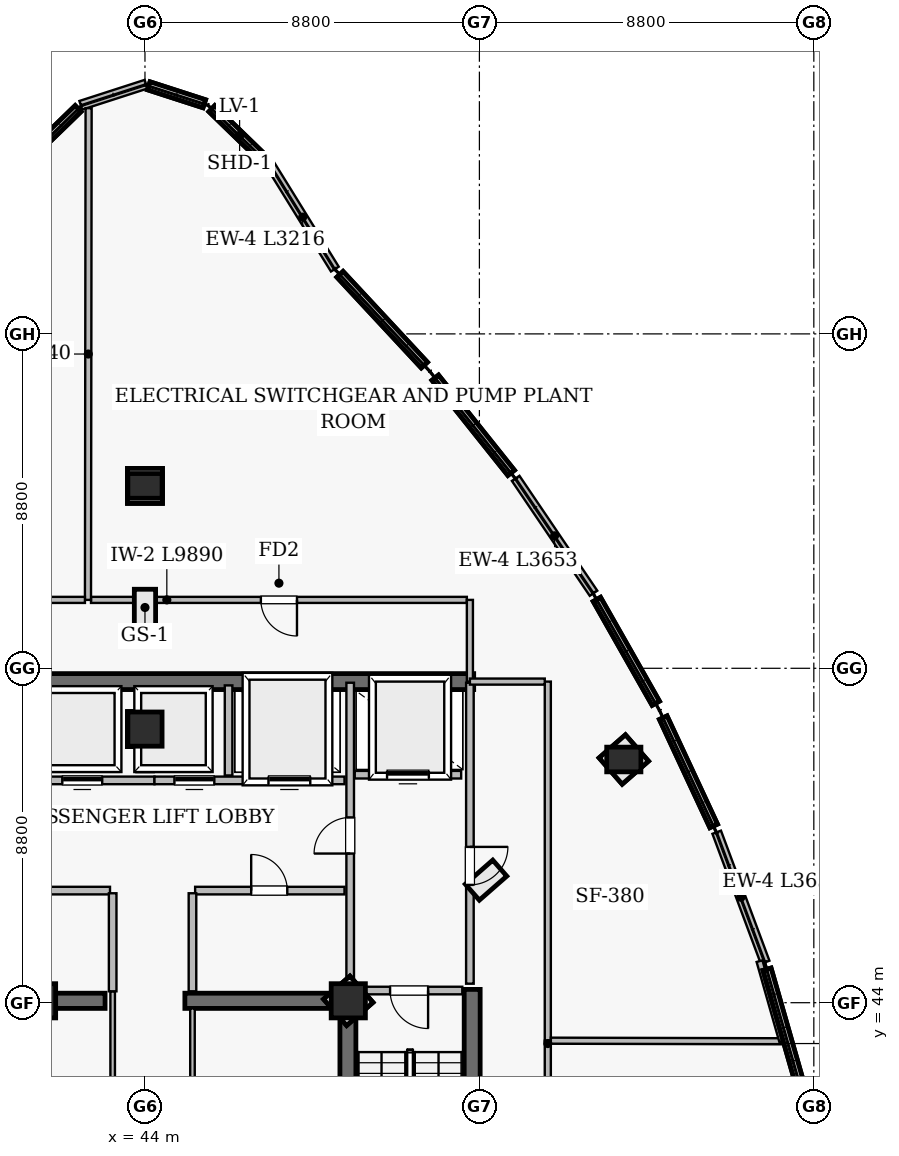
"""IFC4 building model, lengths in metres.
Left out: names, types, materials, properties, quantities, classifications, styles, units other than length and angle.
Written with IfcOpenShell. Run it as: python <this file> out.ifc"""

import sys

from ifc_helpers import new_model, si_unit, direction, frame, frame_2d, origin, origin_2d, place, context, subcontext, project, spatial, rectangle, extrude, element, fill, save


model = new_model("IFC4")
c1 = context("Model", 3, precision=1e-05, world=origin(), true_north=direction((0.0, 1.0)))
c2 = subcontext(c1, "Body", "Model", "MODEL_VIEW")
j1 = project(units=[si_unit("LENGTHUNIT", "METRE"), si_unit("PLANEANGLEUNIT", "RADIAN")], contexts=[c1])
p1 = place(None, origin())
s1 = spatial("IfcSite", under=j1, at=p1, CompositionType="ELEMENT")
p2 = place(p1, origin())
s2 = spatial("IfcBuilding", under=s1, at=p2, CompositionType="ELEMENT")
p3 = place(p2, frame((0.0, 0.0, 282.8)))
s3 = spatial("IfcBuildingStorey", under=s2, at=p3, CompositionType="ELEMENT", Elevation=282.8)
p4 = place(p3, frame((35.35, 52.45, 0.0), z_axis=(0.0, 0.0, 1.0), x_axis=(1.0, 0.0, 0.0)))
e1 = element("IfcWall", 1, at=p4, inside=s3, PredefinedType="SHEAR", context=c2, shape_type="SweptSolid", body=[
    extrude(rectangle(XDim=17.3, YDim=0.42, at=frame_2d((8.65, 0.0))), origin(), (0.0, 0.0, 1.0), 6.51),
])
p5 = place(p3, frame((52.61, 35.18, 0.0), z_axis=(0.0, 0.0, 1.0), x_axis=(0.0, 1.0, 0.0)))
e2 = element("IfcWall", 2, at=p5, inside=s3, PredefinedType="SHEAR", context=c2, shape_type="SweptSolid", body=[
    extrude(rectangle(XDim=9.17, YDim=0.42, at=frame_2d((4.585, 0.0))), origin(), (0.0, 0.0, 1.0), 6.51),
])
p6 = place(p3, frame((49.34, 35.4, 0.0), z_axis=(0.0, 0.0, 1.0), x_axis=(0.0, 1.0, 0.0)))
e3 = element("IfcWall", 3, at=p6, inside=s3, PredefinedType="SHEAR", context=c2, shape_type="SweptSolid", body=[
    extrude(rectangle(XDim=8.95, YDim=0.42, at=frame_2d((4.475, 0.0))), origin(), (0.0, 0.0, 1.0), 6.51),
])
p7 = place(p3, frame((44.0, 50.1, 0.0), z_axis=(0.0, 0.0, 1.0), x_axis=(0.0, 1.0, 0.0)))
e4 = element("IfcWall", 4, at=p7, inside=s3, PredefinedType="SHEAR", context=c2, shape_type="SweptSolid", body=[
    extrude(rectangle(XDim=2.1, YDim=0.4, at=frame_2d((1.05, 0.0))), origin(), (0.0, 0.0, 1.0), 6.51),
])
for number, where, z_axis, x_axis in (
    (5, (38.75, 44.05, 0.0), (0.0, 0.0, 1.0), (1.0, 0.0, 0.0)),
    (6, (45.05, 44.05, 0.0), (0.0, 0.0, 1.0), (1.0, 0.0, 0.0)),
):
    element("IfcWall", number, at=place(p3, frame(where, z_axis=z_axis, x_axis=x_axis)), inside=s3, PredefinedType="SHEAR", context=c2, shape_type="SweptSolid", body=[
        extrude(rectangle(XDim=4.2, YDim=0.4, at=frame_2d((2.1, 0.0))), origin(), (0.0, 0.0, 1.0), 6.51),
    ])
for number, where, z_axis, x_axis in (
    (7, (49.35, 44.05, 0.0), (0.0, 0.0, 1.0), (1.0, 0.0, 0.0)),
    (8, (44.0, 51.2, 0.0), (0.0, 0.0, 1.0), (1.0, 0.0, 0.0)),
    (9, (41.2, 44.05, 0.0), (0.0, 0.0, 1.0), (1.0, 0.0, 0.0)),
):
    element("IfcColumn", number, at=place(p3, frame(where, z_axis=z_axis, x_axis=x_axis)), inside=s3, PredefinedType="COLUMN", context=c2, shape_type="SweptSolid", body=[
        extrude(rectangle(XDim=0.9, YDim=0.9, at=origin_2d()), origin(), (0.0, 0.0, 1.0), 6.8),
    ])
for number, where, z_axis, x_axis in (
    (10, (44.0, 57.6, 0.0), (0.0, 0.0, 1.0), (1.0, 0.0, 0.0)),
    (11, (56.6, 50.4, 0.0), (0.0, 0.0, 1.0), (1.0, 0.0, 0.0)),
):
    element("IfcColumn", number, at=place(p3, frame(where, z_axis=z_axis, x_axis=x_axis)), inside=s3, PredefinedType="COLUMN", context=c2, shape_type="SweptSolid", body=[
        extrude(rectangle(XDim=0.9, YDim=0.65, at=origin_2d()), origin(), (0.0, 0.0, 1.0), 6.8),
    ])
p8 = place(p3, frame((48.996, 63.305, 0.0), z_axis=(0.0, 0.0, 1.0), x_axis=(-0.526048785292, 0.850454393541, 0.0)))
e12 = element("IfcWall", 12, at=p8, inside=s3, PredefinedType="SOLIDWALL", context=c2, shape_type="SweptSolid", body=[
    extrude(rectangle(XDim=3.216, YDim=0.24, at=frame_2d((1.608, 0.0))), origin(), (0.0, 0.0, 1.0), 6.51),
])
p9 = place(p3, frame((44.029, 68.17, 0.0), z_axis=(0.0, 0.0, 1.0), x_axis=(-0.951512079285, -0.307611383039, 0.0)))
e13 = element("IfcWall", 13, at=p9, inside=s3, PredefinedType="SOLIDWALL", context=c2, shape_type="SweptSolid", body=[
    extrude(rectangle(XDim=1.805, YDim=0.24, at=frame_2d((0.902, 0.0))), origin(), (0.0, 0.0, 1.0), 6.51),
])
p10 = place(p3, frame((60.319, 45.063, 0.0), z_axis=(0.0, 0.0, 1.0), x_axis=(-0.349042271825, 0.937106980274, 0.0)))
e14 = element("IfcWall", 14, at=p10, inside=s3, PredefinedType="SOLIDWALL", context=c2, shape_type="SweptSolid", body=[
    extrude(rectangle(XDim=3.653, YDim=0.24, at=frame_2d((1.826, 0.0))), origin(), (0.0, 0.0, 1.0), 6.51),
])
p11 = place(p3, frame((55.803, 54.774, 0.0), z_axis=(0.0, 0.0, 1.0), x_axis=(-0.560839277874, 0.827924697297, 0.0)))
e15 = element("IfcWall", 15, at=p11, inside=s3, PredefinedType="SOLIDWALL", context=c2, shape_type="SweptSolid", body=[
    extrude(rectangle(XDim=3.653, YDim=0.24, at=frame_2d((1.826, 0.0))), origin(), (0.0, 0.0, 1.0), 6.51),
])
p12 = place(p3, frame((52.47, 54.6, 0.0), z_axis=(0.0, 0.0, 1.0), x_axis=(-1.0, 0.0, 0.0)))
e16 = element("IfcWall", 16, at=p12, inside=s3, PredefinedType="SOLIDWALL", context=c2, shape_type="SweptSolid", body=[
    extrude(rectangle(XDim=9.89, YDim=0.16, at=frame_2d((4.945, 0.0))), origin(), (0.0, 0.0, 1.0), 5.798),
])
p13 = place(p12, frame((4.47, 0.0, 0.0)))
e17 = element("IfcOpeningElement", 17, at=p13, cuts=e16, PredefinedType="OPENING", context=c2, shape_type="SweptSolid", body=[
    extrude(rectangle(XDim=0.95, YDim=2.15, at=frame_2d((0.475, 1.075))), frame((0.0, 0.09, 0.0), z_axis=(0.0, -1.0, 0.0), x_axis=(1.0, 0.0, 0.0)), (0.0, 0.0, 1.0), 0.18),
])
p14 = place(p3, frame((43.15, 35.6, 0.0), z_axis=(0.0, 0.0, 1.0), x_axis=(0.0, 1.0, 0.0)))
e18 = element("IfcWall", 18, at=p14, inside=s3, PredefinedType="PARTITIONING", context=c2, shape_type="SweptSolid", body=[
    extrude(rectangle(XDim=8.7, YDim=0.12, at=frame_2d((4.35, 0.0))), origin(), (0.0, 0.0, 1.0), 6.51),
])
p15 = place(p14, frame((3.625, 0.0, 0.0)))
e19 = element("IfcOpeningElement", 19, at=p15, cuts=e18, PredefinedType="OPENING", context=c2, shape_type="SweptSolid", body=[
    extrude(rectangle(XDim=0.95, YDim=2.1, at=frame_2d((0.475, 1.05))), frame((0.0, 0.07, 0.0), z_axis=(0.0, -1.0, 0.0), x_axis=(1.0, 0.0, 0.0)), (0.0, 0.0, 1.0), 0.14),
])
p16 = place(p3, frame((45.25, 35.6, 0.0), z_axis=(0.0, 0.0, 1.0), x_axis=(0.0, 1.0, 0.0)))
e20 = element("IfcWall", 20, at=p16, inside=s3, PredefinedType="PARTITIONING", context=c2, shape_type="SweptSolid", body=[
    extrude(rectangle(XDim=8.25, YDim=0.12, at=frame_2d((4.125, 0.0))), origin(), (0.0, 0.0, 1.0), 6.51),
])
p17 = place(p16, frame((3.625, 0.0, 0.0)))
e21 = element("IfcOpeningElement", 21, at=p17, cuts=e20, PredefinedType="OPENING", context=c2, shape_type="SweptSolid", body=[
    extrude(rectangle(XDim=0.95, YDim=2.1, at=frame_2d((0.475, 1.05))), frame((0.0, 0.07, 0.0), z_axis=(0.0, -1.0, 0.0), x_axis=(1.0, 0.0, 0.0)), (0.0, 0.0, 1.0), 0.14),
])
p18 = place(p3, frame((52.55, 44.5, 0.0), z_axis=(0.0, 0.0, 1.0), x_axis=(0.0, 1.0, 0.0)))
e22 = element("IfcWall", 22, at=p18, inside=s3, PredefinedType="SOLIDWALL", context=c2, shape_type="SweptSolid", body=[
    extrude(rectangle(XDim=7.92, YDim=0.2, at=frame_2d((3.96, 0.0))), origin(), (0.0, 0.0, 1.0), 6.51),
])
p19 = place(p18, frame((2.6, 0.0, 0.0)))
e23 = element("IfcOpeningElement", 23, at=p19, cuts=e22, PredefinedType="OPENING", context=c2, shape_type="SweptSolid", body=[
    extrude(rectangle(XDim=1.0, YDim=2.15, at=frame_2d((0.5, 1.075))), frame((0.0, 0.11, 0.0), z_axis=(0.0, -1.0, 0.0), x_axis=(1.0, 0.0, 0.0)), (0.0, 0.0, 1.0), 0.22),
])
p20 = place(p3, frame((49.4, 44.5, 0.0), z_axis=(0.0, 0.0, 1.0), x_axis=(0.0, 1.0, 0.0)))
e24 = element("IfcWall", 24, at=p20, inside=s3, PredefinedType="SOLIDWALL", context=c2, shape_type="SweptSolid", body=[
    extrude(rectangle(XDim=7.92, YDim=0.2, at=frame_2d((3.96, 0.0))), origin(), (0.0, 0.0, 1.0), 5.598),
])
p21 = place(p20, frame((3.425, 0.0, 0.0)))
e25 = element("IfcOpeningElement", 25, at=p21, cuts=e24, PredefinedType="OPENING", context=c2, shape_type="SweptSolid", body=[
    extrude(rectangle(XDim=0.95, YDim=2.15, at=frame_2d((0.475, 1.075))), frame((0.0, 0.11, 0.0), z_axis=(0.0, -1.0, 0.0), x_axis=(1.0, 0.0, 0.0)), (0.0, 0.0, 1.0), 0.22),
])
p22 = place(p3, frame((38.75, 49.85, 0.0), z_axis=(0.0, 0.0, 1.0), x_axis=(1.0, 0.0, 0.0)))
e26 = element("IfcWall", 26, at=p22, inside=s3, PredefinedType="SOLIDWALL", context=c2, shape_type="SweptSolid", body=[
    extrude(rectangle(XDim=5.5, YDim=0.2, at=frame_2d((2.75, 0.0))), origin(), (0.0, 0.0, 1.0), 6.51),
])
p23 = place(p22, frame((0.675, 0.0, 0.0)))
e27 = element("IfcOpeningElement", 27, at=p23, cuts=e26, PredefinedType="OPENING", context=c2, shape_type="SweptSolid", body=[
    extrude(rectangle(XDim=1.05, YDim=2.15, at=frame_2d((0.525, 1.075))), frame((0.0, 0.11, 0.0), z_axis=(0.0, -1.0, 0.0), x_axis=(1.0, 0.0, 0.0)), (0.0, 0.0, 1.0), 0.22),
])
p24 = place(p22, frame((3.075, 0.0, 0.0)))
e28 = element("IfcOpeningElement", 28, at=p24, cuts=e26, PredefinedType="OPENING", context=c2, shape_type="SweptSolid", body=[
    extrude(rectangle(XDim=1.05, YDim=2.15, at=frame_2d((0.525, 1.075))), frame((0.0, 0.11, 0.0), z_axis=(0.0, -1.0, 0.0), x_axis=(1.0, 0.0, 0.0)), (0.0, 0.0, 1.0), 0.22),
])
p25 = place(p3, frame((44.25, 49.85, 0.0), z_axis=(0.0, 0.0, 1.0), x_axis=(1.0, 0.0, 0.0)))
e29 = element("IfcWall", 29, at=p25, inside=s3, PredefinedType="SOLIDWALL", context=c2, shape_type="SweptSolid", body=[
    extrude(rectangle(XDim=5.0, YDim=0.2, at=frame_2d((2.5, 0.0))), origin(), (0.0, 0.0, 1.0), 5.598),
])
p26 = place(p25, frame((0.525, 0.0, 0.0)))
e30 = element("IfcOpeningElement", 30, at=p26, cuts=e29, PredefinedType="OPENING", context=c2, shape_type="SweptSolid", body=[
    extrude(rectangle(XDim=1.05, YDim=2.15, at=frame_2d((0.525, 1.075))), frame((0.0, 0.11, 0.0), z_axis=(0.0, -1.0, 0.0), x_axis=(1.0, 0.0, 0.0)), (0.0, 0.0, 1.0), 0.22),
])
p27 = place(p25, frame((3.0, 0.0, 0.0)))
e31 = element("IfcOpeningElement", 31, at=p27, cuts=e29, PredefinedType="OPENING", context=c2, shape_type="SweptSolid", body=[
    extrude(rectangle(XDim=1.1, YDim=2.15, at=frame_2d((0.55, 1.075))), frame((0.0, 0.11, 0.0), z_axis=(0.0, -1.0, 0.0), x_axis=(1.0, 0.0, 0.0)), (0.0, 0.0, 1.0), 0.22),
])
p28 = place(p3, frame((38.75, 46.95, 0.0), z_axis=(0.0, 0.0, 1.0), x_axis=(1.0, 0.0, 0.0)))
e32 = element("IfcWall", 32, at=p28, inside=s3, PredefinedType="SOLIDWALL", context=c2, shape_type="SweptSolid", body=[
    extrude(rectangle(XDim=4.33, YDim=0.2, at=frame_2d((2.165, 0.0))), origin(), (0.0, 0.0, 1.0), 6.51),
])
p29 = place(p28, frame((1.675, 0.0, 0.0)))
e33 = element("IfcOpeningElement", 33, at=p29, cuts=e32, PredefinedType="OPENING", context=c2, shape_type="SweptSolid", body=[
    extrude(rectangle(XDim=0.95, YDim=2.1, at=frame_2d((0.475, 1.05))), frame((0.0, 0.11, 0.0), z_axis=(0.0, -1.0, 0.0), x_axis=(1.0, 0.0, 0.0)), (0.0, 0.0, 1.0), 0.22),
])
p30 = place(p3, frame((45.32, 46.95, 0.0), z_axis=(0.0, 0.0, 1.0), x_axis=(1.0, 0.0, 0.0)))
e34 = element("IfcWall", 34, at=p30, inside=s3, PredefinedType="SOLIDWALL", context=c2, shape_type="SweptSolid", body=[
    extrude(rectangle(XDim=3.93, YDim=0.2, at=frame_2d((1.965, 0.0))), origin(), (0.0, 0.0, 1.0), 5.598),
])
p31 = place(p30, frame((1.475, 0.0, 0.0)))
e35 = element("IfcOpeningElement", 35, at=p31, cuts=e34, PredefinedType="OPENING", context=c2, shape_type="SweptSolid", body=[
    extrude(rectangle(XDim=0.95, YDim=2.1, at=frame_2d((0.475, 1.05))), frame((0.0, 0.11, 0.0), z_axis=(0.0, -1.0, 0.0), x_axis=(1.0, 0.0, 0.0)), (0.0, 0.0, 1.0), 0.22),
])
p32 = place(p3, frame((49.55, 44.32, 0.0), z_axis=(0.0, 0.0, 1.0), x_axis=(1.0, 0.0, 0.0)))
e36 = element("IfcWall", 36, at=p32, inside=s3, PredefinedType="SOLIDWALL", context=c2, shape_type="SweptSolid", body=[
    extrude(rectangle(XDim=2.8, YDim=0.2, at=frame_2d((1.4, 0.0))), origin(), (0.0, 0.0, 1.0), 5.598),
])
p33 = place(p32, frame((0.9, 0.0, 0.0)))
e37 = element("IfcOpeningElement", 37, at=p33, cuts=e36, PredefinedType="OPENING", context=c2, shape_type="SweptSolid", body=[
    extrude(rectangle(XDim=1.0, YDim=2.15, at=frame_2d((0.5, 1.075))), frame((0.0, 0.11, 0.0), z_axis=(0.0, -1.0, 0.0), x_axis=(1.0, 0.0, 0.0)), (0.0, 0.0, 1.0), 0.22),
])
p34 = place(p3, frame((49.52, 50.0, 0.0), z_axis=(0.0, 0.0, 1.0), x_axis=(1.0, 0.0, 0.0)))
e38 = element("IfcWall", 38, at=p34, inside=s3, PredefinedType="SOLIDWALL", context=c2, shape_type="SweptSolid", body=[
    extrude(rectangle(XDim=2.8, YDim=0.2, at=frame_2d((1.4, 0.0))), origin(), (0.0, 0.0, 1.0), 6.51),
])
p35 = place(p34, frame((0.85, 0.0, 0.0)))
e39 = element("IfcOpeningElement", 39, at=p35, cuts=e38, PredefinedType="OPENING", context=c2, shape_type="SweptSolid", body=[
    extrude(rectangle(XDim=1.1, YDim=2.15, at=frame_2d((0.55, 1.075))), frame((0.0, 0.11, 0.0), z_axis=(0.0, -1.0, 0.0), x_axis=(1.0, 0.0, 0.0)), (0.0, 0.0, 1.0), 0.22),
])
p36 = place(p3, frame((42.5, 54.6, 0.0), z_axis=(0.0, 0.0, 1.0), x_axis=(0.001320703727, 0.99999912787, 0.0)))
e40 = element("IfcWall", 40, at=p36, inside=s3, PredefinedType="SOLIDWALL", context=c2, shape_type="SweptSolid", body=[
    extrude(rectangle(XDim=12.94, YDim=0.16, at=frame_2d((6.47, 0.0))), origin(), (0.0, 0.0, 1.0), 5.798),
])
p37 = place(p3, frame((42.42, 54.6, 0.0), z_axis=(0.0, 0.0, 1.0), x_axis=(-1.0, 0.0, 0.0)))
e41 = element("IfcWall", 41, at=p37, inside=s3, PredefinedType="SOLIDWALL", context=c2, shape_type="SweptSolid", body=[
    extrude(rectangle(XDim=10.164, YDim=0.16, at=frame_2d((5.082, 0.0))), origin(), (0.0, 0.0, 1.0), 5.798),
])
p38 = place(p3, frame((54.6, 33.4, 0.0), z_axis=(0.0, 0.0, 1.0), x_axis=(0.0, 1.0, 0.0)))
e42 = element("IfcWall", 42, at=p38, inside=s3, PredefinedType="SOLIDWALL", context=c2, shape_type="SweptSolid", body=[
    extrude(rectangle(XDim=9.6, YDim=0.16, at=frame_2d((4.8, 0.0))), origin(), (0.0, 0.0, 1.0), 5.798),
])
p39 = place(p3, frame((54.6, 43.0, 0.0), z_axis=(0.0, 0.0, 1.0), x_axis=(0.0, 1.0, 0.0)))
e43 = element("IfcWall", 43, at=p39, inside=s3, PredefinedType="SOLIDWALL", context=c2, shape_type="SweptSolid", body=[
    extrude(rectangle(XDim=9.45, YDim=0.16, at=frame_2d((4.725, 0.0))), origin(), (0.0, 0.0, 1.0), 5.798),
])
p40 = place(p3, frame((60.771, 42.985, 0.0), z_axis=(0.0, 0.0, 1.0), x_axis=(-0.999997011031, 0.002444980467, 0.0)))
e44 = element("IfcWall", 44, at=p40, inside=s3, PredefinedType="SOLIDWALL", context=c2, shape_type="SweptSolid", body=[
    extrude(rectangle(XDim=6.091, YDim=0.16, at=frame_2d((3.045, 0.0))), origin(), (0.0, 0.0, 1.0), 5.798),
])
for number, where, z_axis, x_axis in (
    (45, (43.15, 44.3, 0.0), (0.0, 0.0, 1.0), (0.0, 1.0, 0.0)),
    (46, (45.25, 44.3, 0.0), (0.0, 0.0, 1.0), (0.0, 1.0, 0.0)),
):
    element("IfcWall", number, at=place(p3, frame(where, z_axis=z_axis, x_axis=x_axis)), inside=s3, PredefinedType="SOLIDWALL", context=c2, shape_type="SweptSolid", body=[
        extrude(rectangle(XDim=2.58, YDim=0.2, at=frame_2d((1.29, 0.0))), origin(), (0.0, 0.0, 1.0), 6.51),
    ])
p41 = place(p3, frame((46.2, 49.98, 0.0), z_axis=(0.0, 0.0, 1.0), x_axis=(0.0, 1.0, 0.0)))
e47 = element("IfcWall", 47, at=p41, inside=s3, PredefinedType="SOLIDWALL", context=c2, shape_type="SweptSolid", body=[
    extrude(rectangle(XDim=2.37, YDim=0.2, at=frame_2d((1.185, 0.0))), origin(), (0.0, 0.0, 1.0), 6.51),
])
p42 = place(p3, frame((60.771, 42.985, 0.0), z_axis=(0.0, 0.0, 1.0), x_axis=(-0.273544099142, 0.961859462616, 0.0)))
e48 = element("IfcWall", 48, at=p42, inside=s3, PredefinedType="SOLIDWALL", context=c2, shape_type="SweptSolid", body=[
    extrude(rectangle(XDim=2.192, YDim=0.16, at=frame_2d((1.096, 0.0))), origin(), (0.0, 0.0, 1.0), 6.51),
])
p43 = place(p3, frame((52.55, 52.45, 0.0), z_axis=(0.0, 0.0, 1.0), x_axis=(0.0, 1.0, 0.0)))
e49 = element("IfcWall", 49, at=p43, inside=s3, PredefinedType="SOLIDWALL", context=c2, shape_type="SweptSolid", body=[
    extrude(rectangle(XDim=2.15, YDim=0.16, at=frame_2d((1.075, 0.0))), origin(), (0.0, 0.0, 1.0), 5.798),
])
p44 = place(p3, frame((54.52, 52.45, 0.0), z_axis=(0.0, 0.0, 1.0), x_axis=(-1.0, 0.0, 0.0)))
e50 = element("IfcWall", 50, at=p44, inside=s3, PredefinedType="SOLIDWALL", context=c2, shape_type="SweptSolid", body=[
    extrude(rectangle(XDim=1.97, YDim=0.16, at=frame_2d((0.985, 0.0))), origin(), (0.0, 0.0, 1.0), 5.798),
])
p45 = place(p33, frame((1.0, 0.0, 0.0), z_axis=(0.0, 0.0, 1.0), x_axis=(-1.0, 0.0, 0.0)))
e51 = element("IfcDoor", 51, at=p45, inside=s3, OperationType="SINGLE_SWING_RIGHT", PredefinedType="DOOR", context=c2, shape_type="SweptSolid", body=[
    extrude(rectangle(XDim=1.0, YDim=2.15, at=frame_2d((0.5, 1.075))), frame((0.0, 0.025, 0.0), z_axis=(0.0, -1.0, 0.0), x_axis=(1.0, 0.0, 0.0)), (0.0, 0.0, 1.0), 0.05),
])
fill(e37, e51)
p46 = place(p19, frame((1.0, 0.0, 0.0), z_axis=(0.0, 0.0, 1.0), x_axis=(-1.0, 0.0, 0.0)))
e52 = element("IfcDoor", 52, at=p46, inside=s3, OperationType="SINGLE_SWING_RIGHT", PredefinedType="DOOR", context=c2, shape_type="SweptSolid", body=[
    extrude(rectangle(XDim=1.0, YDim=2.15, at=frame_2d((0.5, 1.075))), frame((0.0, 0.025, 0.0), z_axis=(0.0, -1.0, 0.0), x_axis=(1.0, 0.0, 0.0)), (0.0, 0.0, 1.0), 0.05),
])
fill(e23, e52)
p47 = place(p21, origin())
e53 = element("IfcDoor", 53, at=p47, inside=s3, OperationType="SINGLE_SWING_LEFT", PredefinedType="DOOR", context=c2, shape_type="SweptSolid", body=[
    extrude(rectangle(XDim=0.95, YDim=2.15, at=frame_2d((0.475, 1.075))), frame((0.0, 0.025, 0.0), z_axis=(0.0, -1.0, 0.0), x_axis=(1.0, 0.0, 0.0)), (0.0, 0.0, 1.0), 0.05),
])
fill(e25, e53)
p48 = place(p35, origin())
e54 = element("IfcDoor", 54, at=p48, inside=s3, OperationType="SLIDING_TO_LEFT", PredefinedType="DOOR", context=c2, shape_type="SweptSolid", body=[
    extrude(rectangle(XDim=1.1, YDim=2.15, at=frame_2d((0.55, 1.075))), frame((0.0, 0.025, 0.0), z_axis=(0.0, -1.0, 0.0), x_axis=(1.0, 0.0, 0.0)), (0.0, 0.0, 1.0), 0.05),
])
fill(e39, e54)
p49 = place(p24, origin())
e55 = element("IfcDoor", 55, at=p49, inside=s3, OperationType="SLIDING_TO_LEFT", PredefinedType="DOOR", context=c2, shape_type="SweptSolid", body=[
    extrude(rectangle(XDim=1.05, YDim=2.15, at=frame_2d((0.525, 1.075))), frame((0.0, 0.025, 0.0), z_axis=(0.0, -1.0, 0.0), x_axis=(1.0, 0.0, 0.0)), (0.0, 0.0, 1.0), 0.05),
])
fill(e28, e55)
p50 = place(p26, origin())
e56 = element("IfcDoor", 56, at=p50, inside=s3, OperationType="SLIDING_TO_LEFT", PredefinedType="DOOR", context=c2, shape_type="SweptSolid", body=[
    extrude(rectangle(XDim=1.05, YDim=2.15, at=frame_2d((0.525, 1.075))), frame((0.0, 0.025, 0.0), z_axis=(0.0, -1.0, 0.0), x_axis=(1.0, 0.0, 0.0)), (0.0, 0.0, 1.0), 0.05),
])
fill(e30, e56)
p51 = place(p27, origin())
e57 = element("IfcDoor", 57, at=p51, inside=s3, OperationType="SLIDING_TO_LEFT", PredefinedType="DOOR", context=c2, shape_type="SweptSolid", body=[
    extrude(rectangle(XDim=1.1, YDim=2.15, at=frame_2d((0.55, 1.075))), frame((0.0, 0.025, 0.0), z_axis=(0.0, -1.0, 0.0), x_axis=(1.0, 0.0, 0.0)), (0.0, 0.0, 1.0), 0.05),
])
fill(e31, e57)
p52 = place(p31, origin())
e58 = element("IfcDoor", 58, at=p52, inside=s3, OperationType="SINGLE_SWING_LEFT", PredefinedType="DOOR", context=c2, shape_type="SweptSolid", body=[
    extrude(rectangle(XDim=0.95, YDim=2.1, at=frame_2d((0.475, 1.05))), frame((0.0, 0.025, 0.0), z_axis=(0.0, -1.0, 0.0), x_axis=(1.0, 0.0, 0.0)), (0.0, 0.0, 1.0), 0.05),
])
fill(e35, e58)
p53 = place(p13, origin())
e59 = element("IfcDoor", 59, at=p53, inside=s3, OperationType="SINGLE_SWING_LEFT", PredefinedType="DOOR", context=c2, shape_type="SweptSolid", body=[
    extrude(rectangle(XDim=0.95, YDim=2.15, at=frame_2d((0.475, 1.075))), frame((0.0, 0.025, 0.0), z_axis=(0.0, -1.0, 0.0), x_axis=(1.0, 0.0, 0.0)), (0.0, 0.0, 1.0), 0.05),
])
fill(e17, e59)
save(model, sys.argv[1])
